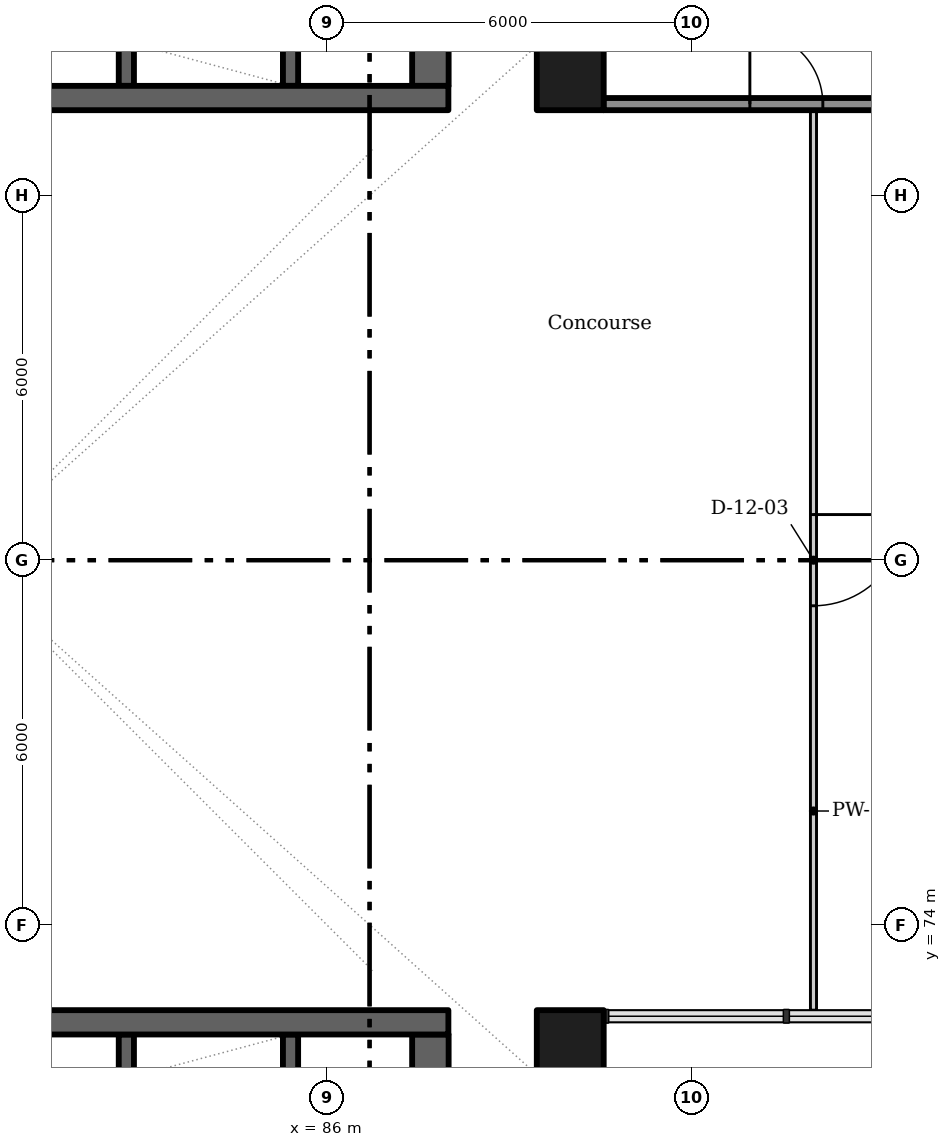
"""IFC4 building model, lengths in metres.
Left out: names, types, materials, properties, quantities, classifications, styles, units other than length and angle.
Written with IfcOpenShell. Run it as: python <this file> out.ifc"""

import sys

from ifc_helpers import new_model, si_unit, direction, frame, frame_2d, origin, origin_2d, place, context, subcontext, project, spatial, rectangle, extrude, element, fill, save


model = new_model("IFC4")
c1 = context("Model", 3, precision=1e-05, world=origin(), true_north=direction((0.0, 1.0)))
c2 = subcontext(c1, "Body", "Model", "MODEL_VIEW")
j1 = project(units=[si_unit("LENGTHUNIT", "METRE"), si_unit("PLANEANGLEUNIT", "RADIAN")], contexts=[c1])
p1 = place(None, origin())
s1 = spatial("IfcSite", under=j1, at=p1, CompositionType="ELEMENT")
p2 = place(p1, origin())
s2 = spatial("IfcBuilding", under=s1, at=p2, CompositionType="ELEMENT")
p3 = place(p2, origin())
s3 = spatial("IfcBuildingStorey", under=s2, at=p3, CompositionType="ELEMENT", Elevation=0.0)
for number, where, z_axis, x_axis in (
    (1, (90.0, 72.05, -1.8), (0.0, 0.0, 1.0), (0.0, 1.0, 0.0)),
    (2, (90.0, 87.95, -1.8), (0.0, 0.0, 1.0), (0.0, 1.0, 0.0)),
):
    element("IfcColumn", number, at=place(p3, frame(where, z_axis=z_axis, x_axis=x_axis)), inside=s3, PredefinedType="COLUMN", context=c2, shape_type="SweptSolid", body=[
        extrude(rectangle(XDim=1.1, YDim=1.1, at=origin_2d()), origin(), (0.0, 0.0, 1.0), 8.4),
    ])
p4 = place(p3, frame((90.546, 87.5, 0.0), z_axis=(0.0, 0.0, 1.0), x_axis=(1.0, 0.0, 0.0)))
e3 = element("IfcWall", 3, at=p4, inside=s3, PredefinedType="SOLIDWALL", context=c2, shape_type="SweptSolid", body=[
    extrude(rectangle(XDim=6.016, YDim=0.2, at=frame_2d((3.008, 0.0))), origin(), (0.0, 0.0, 1.0), 5.4),
])
p5 = place(p4, frame((2.408, 0.0, 0.0)))
e4 = element("IfcOpeningElement", 4, at=p5, cuts=e3, PredefinedType="OPENING", context=c2, shape_type="SweptSolid", body=[
    extrude(rectangle(XDim=1.2, YDim=2.4, at=frame_2d((0.6, 1.2))), frame((0.0, 0.11, 0.0), z_axis=(0.0, -1.0, 0.0), x_axis=(1.0, 0.0, 0.0)), (0.0, 0.0, 1.0), 0.22),
])
for number, where, z_axis, x_axis in (
    (5, (82.7, 87.8, -1.8), (0.0, 0.0, 1.0), (0.0, 1.0, 0.0)),
    (6, (85.4, 87.8, -1.8), (0.0, 0.0, 1.0), (0.0, 1.0, 0.0)),
):
    element("IfcWall", number, at=place(p3, frame(where, z_axis=z_axis, x_axis=x_axis)), inside=s3, PredefinedType="SHEAR", context=c2, shape_type="SweptSolid", body=[
        extrude(rectangle(XDim=2.9, YDim=0.25, at=frame_2d((1.45, 0.0))), origin(), (0.0, 0.0, 1.0), 8.1),
    ])
p6 = place(p3, frame((87.7, 87.8, -1.8), z_axis=(0.0, 0.0, 1.0), x_axis=(0.0, 1.0, 0.0)))
e7 = element("IfcWall", 7, at=p6, inside=s3, PredefinedType="SHEAR", context=c2, shape_type="SweptSolid", body=[
    extrude(rectangle(XDim=15.6, YDim=0.6, at=frame_2d((7.8, 0.0))), origin(), (0.0, 0.0, 1.0), 8.1),
])
p7 = place(p6, frame((3.85, 0.0, 1.8)))
e8 = element("IfcOpeningElement", 8, at=p7, cuts=e7, PredefinedType="OPENING", context=c2, shape_type="SweptSolid", body=[
    extrude(rectangle(XDim=1.5, YDim=2.1, at=frame_2d((0.75, 1.05))), frame((0.0, 0.31, 0.0), z_axis=(0.0, -1.0, 0.0), x_axis=(1.0, 0.0, 0.0)), (0.0, 0.0, 1.0), 0.62),
])
p8 = place(p6, frame((11.799, 0.0, 1.8)))
e9 = element("IfcOpeningElement", 9, at=p8, cuts=e7, PredefinedType="OPENING", context=c2, shape_type="SweptSolid", body=[
    extrude(rectangle(XDim=1.1, YDim=2.1, at=frame_2d((0.55, 1.05))), frame((0.0, 0.31, 0.0), z_axis=(0.0, -1.0, 0.0), x_axis=(1.0, 0.0, 0.0)), (0.0, 0.0, 1.0), 0.62),
])
for number, where, z_axis, x_axis in (
    (10, (82.7, 69.3, -1.8), (0.0, 0.0, 1.0), (0.0, 1.0, 0.0)),
    (11, (85.4, 69.3, -1.8), (0.0, 0.0, 1.0), (0.0, 1.0, 0.0)),
):
    element("IfcWall", number, at=place(p3, frame(where, z_axis=z_axis, x_axis=x_axis)), inside=s3, PredefinedType="SHEAR", context=c2, shape_type="SweptSolid", body=[
        extrude(rectangle(XDim=2.9, YDim=0.25, at=frame_2d((1.45, 0.0))), origin(), (0.0, 0.0, 1.0), 8.1),
    ])
p9 = place(p3, frame((87.7, 56.6, -1.8), z_axis=(0.0, 0.0, 1.0), x_axis=(0.0, 1.0, 0.0)))
e12 = element("IfcWall", 12, at=p9, inside=s3, PredefinedType="SHEAR", context=c2, shape_type="SweptSolid", body=[
    extrude(rectangle(XDim=15.6, YDim=0.6, at=frame_2d((7.8, 0.0))), origin(), (0.0, 0.0, 1.0), 8.1),
])
p10 = place(p9, frame((2.702, 0.0, 1.8)))
e13 = element("IfcOpeningElement", 13, at=p10, cuts=e12, PredefinedType="OPENING", context=c2, shape_type="SweptSolid", body=[
    extrude(rectangle(XDim=1.1, YDim=2.1, at=frame_2d((0.55, 1.05))), frame((0.0, 0.31, 0.0), z_axis=(0.0, -1.0, 0.0), x_axis=(1.0, 0.0, 0.0)), (0.0, 0.0, 1.0), 0.62),
])
p11 = place(p3, frame((94.0, 87.4, 0.0), z_axis=(0.0, 0.0, 1.0), x_axis=(0.0, -1.0, 0.0)))
e14 = element("IfcWall", 14, at=p11, inside=s3, PredefinedType="PARTITIONING", context=c2, shape_type="SweptSolid", body=[
    extrude(rectangle(XDim=14.8, YDim=0.1, at=frame_2d((7.4, 0.0))), origin(), (0.0, 0.0, 1.0), 6.3),
])
p12 = place(p11, frame((6.65, 0.0, 0.0)))
e15 = element("IfcOpeningElement", 15, at=p12, cuts=e14, PredefinedType="OPENING", context=c2, shape_type="SweptSolid", body=[
    extrude(rectangle(XDim=1.5, YDim=2.1, at=frame_2d((0.75, 1.05))), frame((0.0, 0.06, 0.0), z_axis=(0.0, -1.0, 0.0), x_axis=(1.0, 0.0, 0.0)), (0.0, 0.0, 1.0), 0.12),
])
for number, where, z_axis, x_axis in (
    (16, (72.004, 87.6, -1.8), (0.0, 0.0, 1.0), (1.0, 0.0, 0.0)),
    (17, (72.004, 72.4, -1.8), (0.0, 0.0, 1.0), (1.0, 0.0, 0.0)),
):
    element("IfcWall", number, at=place(p3, frame(where, z_axis=z_axis, x_axis=x_axis)), inside=s3, PredefinedType="SHEAR", context=c2, shape_type="SweptSolid", body=[
        extrude(rectangle(XDim=15.992, YDim=0.4, at=frame_2d((7.996, 0.0))), origin(), (0.0, 0.0, 1.0), 8.1),
    ])
p13 = place(p5, origin())
e18 = element("IfcDoor", 18, at=p13, inside=s3, OperationType="SINGLE_SWING_LEFT", PredefinedType="DOOR", context=c2, shape_type="SweptSolid", body=[
    extrude(rectangle(XDim=1.2, YDim=2.4, at=frame_2d((0.6, 1.2))), frame((0.0, 0.025, 0.0), z_axis=(0.0, -1.0, 0.0), x_axis=(1.0, 0.0, 0.0)), (0.0, 0.0, 1.0), 0.05),
])
fill(e4, e18)
p14 = place(p12, origin())
e19 = element("IfcDoor", 19, at=p14, inside=s3, OperationType="DOUBLE_DOOR_SINGLE_SWING", PredefinedType="DOOR", context=c2, shape_type="SweptSolid", body=[
    extrude(rectangle(XDim=1.5, YDim=2.1, at=frame_2d((0.75, 1.05))), frame((0.0, 0.025, 0.0), z_axis=(0.0, -1.0, 0.0), x_axis=(1.0, 0.0, 0.0)), (0.0, 0.0, 1.0), 0.05),
])
fill(e15, e19)
save(model, sys.argv[1])
